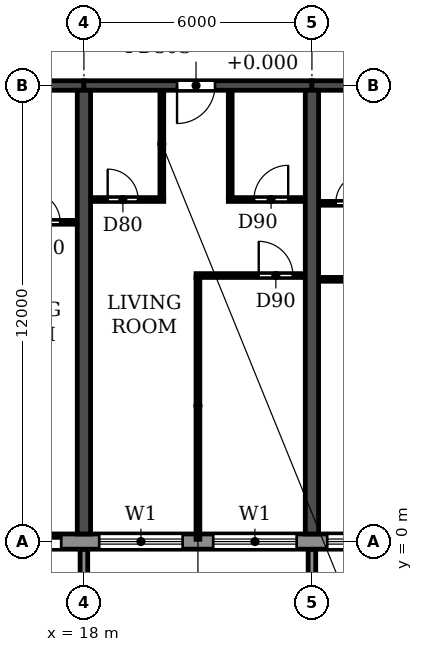
"""IFC4 building model, lengths in metres.
Left out: names, types, materials, properties, quantities, classifications, styles, units other than length and angle.
Written with IfcOpenShell. Run it as: python <this file> out.ifc"""

import sys

from ifc_helpers import new_model, si_unit, direction, frame, frame_2d, origin, place, context, subcontext, project, spatial, polyline, rectangle, outline, extrude, source, transform, mapped, element, fill, save


model = new_model("IFC4")
c1 = context("Model", 3, precision=1e-05, world=origin(), true_north=direction((0.0, 1.0)))
c2 = subcontext(c1, "Body", "Model", "MODEL_VIEW")
j1 = project(units=[si_unit("LENGTHUNIT", "METRE"), si_unit("PLANEANGLEUNIT", "RADIAN")], contexts=[c1])
p1 = place(None, origin())
s1 = spatial("IfcSite", under=j1, at=p1, CompositionType="ELEMENT")
p2 = place(p1, origin())
s2 = spatial("IfcBuilding", under=s1, at=p2, CompositionType="ELEMENT")
p3 = place(p2, frame((0.0, 0.0, 72.9)))
s3 = spatial("IfcBuildingStorey", under=s2, at=p3, CompositionType="ELEMENT", Elevation=72.9)
for number, where, z_axis, x_axis in (
    (1, (18.0, 0.2, 0.0), (0.0, 0.0, 1.0), (0.0, 1.0, 0.0)),
    (2, (24.0, 0.2, 0.0), (0.0, 0.0, 1.0), (0.0, 1.0, 0.0)),
):
    element("IfcWall", number, at=place(p3, frame(where, z_axis=z_axis, x_axis=x_axis)), inside=s3, PredefinedType="SHEAR", context=c2, shape_type="SweptSolid", body=[
        extrude(rectangle(XDim=11.675, YDim=0.35, at=frame_2d((5.837, 0.0))), origin(), (0.0, 0.0, 1.0), 3.06),
    ])
p4 = place(p3, frame((12.0, 12.0, 0.0), z_axis=(0.0, 0.0, 1.0), x_axis=(1.0, 0.0, 0.0)))
e3 = element("IfcWall", 3, at=p4, inside=s3, PredefinedType="SHEAR", context=c2, shape_type="SweptSolid", body=[
    extrude(rectangle(XDim=6.0, YDim=0.25, at=frame_2d((3.0, 0.0))), origin(), (0.0, 0.0, 1.0), 2.46),
])
p5 = place(p4, frame((2.55, 0.0, 0.0)))
e4 = element("IfcOpeningElement", 4, at=p5, cuts=e3, PredefinedType="OPENING", context=c2, shape_type="SweptSolid", body=[
    extrude(rectangle(XDim=1.0, YDim=2.1, at=frame_2d((0.5, 1.05))), frame((0.0, 0.135, 0.0), z_axis=(0.0, -1.0, 0.0), x_axis=(1.0, 0.0, 0.0)), (0.0, 0.0, 1.0), 0.27),
])
p6 = place(p3, frame((18.0, 12.0, 0.0), z_axis=(0.0, 0.0, 1.0), x_axis=(1.0, 0.0, 0.0)))
e5 = element("IfcWall", 5, at=p6, inside=s3, PredefinedType="SHEAR", context=c2, shape_type="SweptSolid", body=[
    extrude(rectangle(XDim=6.0, YDim=0.25, at=frame_2d((3.0, 0.0))), origin(), (0.0, 0.0, 1.0), 2.46),
])
p7 = place(p6, frame((2.45, 0.0, 0.0)))
e6 = element("IfcOpeningElement", 6, at=p7, cuts=e5, PredefinedType="OPENING", context=c2, shape_type="SweptSolid", body=[
    extrude(rectangle(XDim=1.0, YDim=2.1, at=frame_2d((0.5, 1.05))), frame((0.0, 0.135, 0.0), z_axis=(0.0, -1.0, 0.0), x_axis=(1.0, 0.0, 0.0)), (0.0, 0.0, 1.0), 0.27),
])
p8 = place(p3, frame((24.0, 12.0, 0.0), z_axis=(0.0, 0.0, 1.0), x_axis=(1.0, 0.0, 0.0)))
e7 = element("IfcWall", 7, at=p8, inside=s3, PredefinedType="SHEAR", context=c2, shape_type="SweptSolid", body=[
    extrude(rectangle(XDim=6.0, YDim=0.25, at=frame_2d((3.0, 0.0))), origin(), (0.0, 0.0, 1.0), 2.46),
])
p9 = place(p8, frame((2.45, 0.0, 0.0)))
e8 = element("IfcOpeningElement", 8, at=p9, cuts=e7, PredefinedType="OPENING", context=c2, shape_type="SweptSolid", body=[
    extrude(rectangle(XDim=1.0, YDim=2.1, at=frame_2d((0.5, 1.05))), frame((0.0, 0.135, 0.0), z_axis=(0.0, -1.0, 0.0), x_axis=(1.0, 0.0, 0.0)), (0.0, 0.0, 1.0), 0.27),
])
p10 = place(p3, frame((10.683, 0.0, 0.0), z_axis=(0.0, 0.0, 1.0), x_axis=(1.0, 0.0, 0.0)))
e9 = element("IfcWall", 9, at=p10, inside=s3, PredefinedType="STANDARD", context=c2, shape_type="SweptSolid", body=[
    extrude(rectangle(XDim=80.634, YDim=0.4, at=frame_2d((40.317, 0.0))), origin(), (0.0, 0.0, 1.0), 3.06),
])
p11 = place(p10, frame((1.717, 0.0, 0.9)))
e10 = element("IfcOpeningElement", 10, at=p11, cuts=e9, PredefinedType="OPENING", context=c2, shape_type="SweptSolid", body=[
    extrude(rectangle(XDim=2.2, YDim=1.5, at=frame_2d((1.1, 0.75))), frame((0.0, 0.21, 0.0), z_axis=(0.0, -1.0, 0.0), x_axis=(1.0, 0.0, 0.0)), (0.0, 0.0, 1.0), 0.42),
])
p12 = place(p10, frame((4.917, 0.0, 0.0)))
e11 = element("IfcOpeningElement", 11, at=p12, cuts=e9, PredefinedType="OPENING", context=c2, shape_type="SweptSolid", body=[
    extrude(rectangle(XDim=1.8, YDim=2.4, at=frame_2d((0.9, 1.2))), frame((0.0, 0.21, 0.0), z_axis=(0.0, -1.0, 0.0), x_axis=(1.0, 0.0, 0.0)), (0.0, 0.0, 1.0), 0.42),
])
p13 = place(p10, frame((7.717, 0.0, 0.9)))
e12 = element("IfcOpeningElement", 12, at=p13, cuts=e9, PredefinedType="OPENING", context=c2, shape_type="SweptSolid", body=[
    extrude(rectangle(XDim=2.2, YDim=1.5, at=frame_2d((1.1, 0.75))), frame((0.0, 0.21, 0.0), z_axis=(0.0, -1.0, 0.0), x_axis=(1.0, 0.0, 0.0)), (0.0, 0.0, 1.0), 0.42),
])
p14 = place(p10, frame((10.717, 0.0, 0.9)))
e13 = element("IfcOpeningElement", 13, at=p14, cuts=e9, PredefinedType="OPENING", context=c2, shape_type="SweptSolid", body=[
    extrude(rectangle(XDim=2.2, YDim=1.5, at=frame_2d((1.1, 0.75))), frame((0.0, 0.21, 0.0), z_axis=(0.0, -1.0, 0.0), x_axis=(1.0, 0.0, 0.0)), (0.0, 0.0, 1.0), 0.42),
])
p15 = place(p10, frame((13.717, 0.0, 0.9)))
e14 = element("IfcOpeningElement", 14, at=p15, cuts=e9, PredefinedType="OPENING", context=c2, shape_type="SweptSolid", body=[
    extrude(rectangle(XDim=2.2, YDim=1.5, at=frame_2d((1.1, 0.75))), frame((0.0, 0.21, 0.0), z_axis=(0.0, -1.0, 0.0), x_axis=(1.0, 0.0, 0.0)), (0.0, 0.0, 1.0), 0.42),
])
p16 = place(p10, frame((16.917, 0.0, 0.0)))
e15 = element("IfcOpeningElement", 15, at=p16, cuts=e9, PredefinedType="OPENING", context=c2, shape_type="SweptSolid", body=[
    extrude(rectangle(XDim=1.8, YDim=2.4, at=frame_2d((0.9, 1.2))), frame((0.0, 0.21, 0.0), z_axis=(0.0, -1.0, 0.0), x_axis=(1.0, 0.0, 0.0)), (0.0, 0.0, 1.0), 0.42),
])
p17 = place(p10, frame((19.717, 0.0, 0.9)))
e16 = element("IfcOpeningElement", 16, at=p17, cuts=e9, PredefinedType="OPENING", context=c2, shape_type="SweptSolid", body=[
    extrude(rectangle(XDim=2.2, YDim=1.5, at=frame_2d((1.1, 0.75))), frame((0.0, 0.21, 0.0), z_axis=(0.0, -1.0, 0.0), x_axis=(1.0, 0.0, 0.0)), (0.0, 0.0, 1.0), 0.42),
])
p18 = place(p10, frame((22.717, 0.0, 0.9)))
e17 = element("IfcOpeningElement", 17, at=p18, cuts=e9, PredefinedType="OPENING", context=c2, shape_type="SweptSolid", body=[
    extrude(rectangle(XDim=2.2, YDim=1.5, at=frame_2d((1.1, 0.75))), frame((0.0, 0.21, 0.0), z_axis=(0.0, -1.0, 0.0), x_axis=(1.0, 0.0, 0.0)), (0.0, 0.0, 1.0), 0.42),
])
p19 = place(p10, frame((25.917, 0.0, 0.0)))
e18 = element("IfcOpeningElement", 18, at=p19, cuts=e9, PredefinedType="OPENING", context=c2, shape_type="SweptSolid", body=[
    extrude(rectangle(XDim=1.8, YDim=2.4, at=frame_2d((0.9, 1.2))), frame((0.0, 0.21, 0.0), z_axis=(0.0, -1.0, 0.0), x_axis=(1.0, 0.0, 0.0)), (0.0, 0.0, 1.0), 0.42),
])
p20 = place(p10, frame((28.717, 0.0, 0.9)))
e19 = element("IfcOpeningElement", 19, at=p20, cuts=e9, PredefinedType="OPENING", context=c2, shape_type="SweptSolid", body=[
    extrude(rectangle(XDim=2.2, YDim=1.5, at=frame_2d((1.1, 0.75))), frame((0.0, 0.21, 0.0), z_axis=(0.0, -1.0, 0.0), x_axis=(1.0, 0.0, 0.0)), (0.0, 0.0, 1.0), 0.42),
])
p21 = place(p10, frame((31.717, 0.0, 0.9)))
e20 = element("IfcOpeningElement", 20, at=p21, cuts=e9, PredefinedType="OPENING", context=c2, shape_type="SweptSolid", body=[
    extrude(rectangle(XDim=2.2, YDim=1.5, at=frame_2d((1.1, 0.75))), frame((0.0, 0.21, 0.0), z_axis=(0.0, -1.0, 0.0), x_axis=(1.0, 0.0, 0.0)), (0.0, 0.0, 1.0), 0.42),
])
p22 = place(p10, frame((34.717, 0.0, 0.9)))
e21 = element("IfcOpeningElement", 21, at=p22, cuts=e9, PredefinedType="OPENING", context=c2, shape_type="SweptSolid", body=[
    extrude(rectangle(XDim=2.2, YDim=1.5, at=frame_2d((1.1, 0.75))), frame((0.0, 0.21, 0.0), z_axis=(0.0, -1.0, 0.0), x_axis=(1.0, 0.0, 0.0)), (0.0, 0.0, 1.0), 0.42),
])
p23 = place(p10, frame((37.917, 0.0, 0.0)))
e22 = element("IfcOpeningElement", 22, at=p23, cuts=e9, PredefinedType="OPENING", context=c2, shape_type="SweptSolid", body=[
    extrude(rectangle(XDim=1.8, YDim=2.4, at=frame_2d((0.9, 1.2))), frame((0.0, 0.21, 0.0), z_axis=(0.0, -1.0, 0.0), x_axis=(1.0, 0.0, 0.0)), (0.0, 0.0, 1.0), 0.42),
])
p24 = place(p10, frame((40.717, 0.0, 0.9)))
e23 = element("IfcOpeningElement", 23, at=p24, cuts=e9, PredefinedType="OPENING", context=c2, shape_type="SweptSolid", body=[
    extrude(rectangle(XDim=2.2, YDim=1.5, at=frame_2d((1.1, 0.75))), frame((0.0, 0.21, 0.0), z_axis=(0.0, -1.0, 0.0), x_axis=(1.0, 0.0, 0.0)), (0.0, 0.0, 1.0), 0.42),
])
p25 = place(p10, frame((43.717, 0.0, 0.9)))
e24 = element("IfcOpeningElement", 24, at=p25, cuts=e9, PredefinedType="OPENING", context=c2, shape_type="SweptSolid", body=[
    extrude(rectangle(XDim=2.2, YDim=1.5, at=frame_2d((1.1, 0.75))), frame((0.0, 0.21, 0.0), z_axis=(0.0, -1.0, 0.0), x_axis=(1.0, 0.0, 0.0)), (0.0, 0.0, 1.0), 0.42),
])
p26 = place(p10, frame((46.717, 0.0, 0.9)))
e25 = element("IfcOpeningElement", 25, at=p26, cuts=e9, PredefinedType="OPENING", context=c2, shape_type="SweptSolid", body=[
    extrude(rectangle(XDim=2.2, YDim=1.5, at=frame_2d((1.1, 0.75))), frame((0.0, 0.21, 0.0), z_axis=(0.0, -1.0, 0.0), x_axis=(1.0, 0.0, 0.0)), (0.0, 0.0, 1.0), 0.42),
])
p27 = place(p10, frame((49.917, 0.0, 0.0)))
e26 = element("IfcOpeningElement", 26, at=p27, cuts=e9, PredefinedType="OPENING", context=c2, shape_type="SweptSolid", body=[
    extrude(rectangle(XDim=1.8, YDim=2.4, at=frame_2d((0.9, 1.2))), frame((0.0, 0.21, 0.0), z_axis=(0.0, -1.0, 0.0), x_axis=(1.0, 0.0, 0.0)), (0.0, 0.0, 1.0), 0.42),
])
p28 = place(p10, frame((52.717, 0.0, 0.9)))
e27 = element("IfcOpeningElement", 27, at=p28, cuts=e9, PredefinedType="OPENING", context=c2, shape_type="SweptSolid", body=[
    extrude(rectangle(XDim=2.2, YDim=1.5, at=frame_2d((1.1, 0.75))), frame((0.0, 0.21, 0.0), z_axis=(0.0, -1.0, 0.0), x_axis=(1.0, 0.0, 0.0)), (0.0, 0.0, 1.0), 0.42),
])
p29 = place(p10, frame((55.717, 0.0, 0.9)))
e28 = element("IfcOpeningElement", 28, at=p29, cuts=e9, PredefinedType="OPENING", context=c2, shape_type="SweptSolid", body=[
    extrude(rectangle(XDim=2.2, YDim=1.5, at=frame_2d((1.1, 0.75))), frame((0.0, 0.21, 0.0), z_axis=(0.0, -1.0, 0.0), x_axis=(1.0, 0.0, 0.0)), (0.0, 0.0, 1.0), 0.42),
])
p30 = place(p10, frame((58.717, 0.0, 0.9)))
e29 = element("IfcOpeningElement", 29, at=p30, cuts=e9, PredefinedType="OPENING", context=c2, shape_type="SweptSolid", body=[
    extrude(rectangle(XDim=2.2, YDim=1.5, at=frame_2d((1.1, 0.75))), frame((0.0, 0.21, 0.0), z_axis=(0.0, -1.0, 0.0), x_axis=(1.0, 0.0, 0.0)), (0.0, 0.0, 1.0), 0.42),
])
p31 = place(p10, frame((61.717, 0.0, 0.9)))
e30 = element("IfcOpeningElement", 30, at=p31, cuts=e9, PredefinedType="OPENING", context=c2, shape_type="SweptSolid", body=[
    extrude(rectangle(XDim=2.2, YDim=1.5, at=frame_2d((1.1, 0.75))), frame((0.0, 0.21, 0.0), z_axis=(0.0, -1.0, 0.0), x_axis=(1.0, 0.0, 0.0)), (0.0, 0.0, 1.0), 0.42),
])
p32 = place(p10, frame((64.917, 0.0, 0.0)))
e31 = element("IfcOpeningElement", 31, at=p32, cuts=e9, PredefinedType="OPENING", context=c2, shape_type="SweptSolid", body=[
    extrude(rectangle(XDim=1.8, YDim=2.4, at=frame_2d((0.9, 1.2))), frame((0.0, 0.21, 0.0), z_axis=(0.0, -1.0, 0.0), x_axis=(1.0, 0.0, 0.0)), (0.0, 0.0, 1.0), 0.42),
])
p33 = place(p10, frame((67.717, 0.0, 0.9)))
e32 = element("IfcOpeningElement", 32, at=p33, cuts=e9, PredefinedType="OPENING", context=c2, shape_type="SweptSolid", body=[
    extrude(rectangle(XDim=2.2, YDim=1.5, at=frame_2d((1.1, 0.75))), frame((0.0, 0.21, 0.0), z_axis=(0.0, -1.0, 0.0), x_axis=(1.0, 0.0, 0.0)), (0.0, 0.0, 1.0), 0.42),
])
p34 = place(p10, frame((70.717, 0.0, 0.9)))
e33 = element("IfcOpeningElement", 33, at=p34, cuts=e9, PredefinedType="OPENING", context=c2, shape_type="SweptSolid", body=[
    extrude(rectangle(XDim=2.2, YDim=1.5, at=frame_2d((1.1, 0.75))), frame((0.0, 0.21, 0.0), z_axis=(0.0, -1.0, 0.0), x_axis=(1.0, 0.0, 0.0)), (0.0, 0.0, 1.0), 0.42),
])
p35 = place(p10, frame((73.917, 0.0, 0.0)))
e34 = element("IfcOpeningElement", 34, at=p35, cuts=e9, PredefinedType="OPENING", context=c2, shape_type="SweptSolid", body=[
    extrude(rectangle(XDim=1.8, YDim=2.4, at=frame_2d((0.9, 1.2))), frame((0.0, 0.21, 0.0), z_axis=(0.0, -1.0, 0.0), x_axis=(1.0, 0.0, 0.0)), (0.0, 0.0, 1.0), 0.42),
])
p36 = place(p10, frame((76.717, 0.0, 0.9)))
e35 = element("IfcOpeningElement", 35, at=p36, cuts=e9, PredefinedType="OPENING", context=c2, shape_type="SweptSolid", body=[
    extrude(rectangle(XDim=2.2, YDim=1.5, at=frame_2d((1.1, 0.75))), frame((0.0, 0.21, 0.0), z_axis=(0.0, -1.0, 0.0), x_axis=(1.0, 0.0, 0.0)), (0.0, 0.0, 1.0), 0.42),
])
m1 = source(origin(), c2, "Body", "SweptSolid", [
    extrude(outline(polyline([(0.0, 0.0), (0.2, 0.0), (0.2, 1.65), (0.0, 1.65), (0.0, 0.0)])), origin(), (0.0, 0.0, 1.0), 3.1),
])
for number, where in (
    (36, (17.9, -1.85, 0.0)),
    (37, (23.9, -1.85, 0.0)),
):
    element("IfcWall", number, at=place(p3, frame(where)), inside=s3, PredefinedType="STANDARD", context=c2, shape_type="MappedRepresentation", body=[
        mapped(m1, transform((0.0, 0.0, 0.0))),
    ])
p37 = place(p3, frame((24.185, 6.9, 0.0), z_axis=(0.0, 0.0, 1.0), x_axis=(1.0, 0.0, 0.0)))
e38 = element("IfcWall", 38, at=p37, inside=s3, PredefinedType="PARTITIONING", context=c2, shape_type="SweptSolid", body=[
    extrude(rectangle(XDim=2.865, YDim=0.1, at=frame_2d((1.433, 0.0))), origin(), (0.0, 0.0, 1.0), 3.06),
])
p38 = place(p37, frame((1.415, 0.0, 0.0)))
e39 = element("IfcOpeningElement", 39, at=p38, cuts=e38, PredefinedType="OPENING", context=c2, shape_type="SweptSolid", body=[
    extrude(rectangle(XDim=0.9, YDim=2.1, at=frame_2d((0.45, 1.05))), frame((0.0, 0.06, 0.0), z_axis=(0.0, -1.0, 0.0), x_axis=(1.0, 0.0, 0.0)), (0.0, 0.0, 1.0), 0.12),
])
p39 = place(p3, frame((20.95, 7.0, 0.0), z_axis=(0.0, 0.0, 1.0), x_axis=(1.0, 0.0, 0.0)))
e40 = element("IfcWall", 40, at=p39, inside=s3, PredefinedType="PARTITIONING", context=c2, shape_type="SweptSolid", body=[
    extrude(rectangle(XDim=2.865, YDim=0.1, at=frame_2d((1.433, 0.0))), origin(), (0.0, 0.0, 1.0), 3.06),
])
p40 = place(p39, frame((1.65, 0.0, 0.0)))
e41 = element("IfcOpeningElement", 41, at=p40, cuts=e40, PredefinedType="OPENING", context=c2, shape_type="SweptSolid", body=[
    extrude(rectangle(XDim=0.9, YDim=2.1, at=frame_2d((0.45, 1.05))), frame((0.0, 0.06, 0.0), z_axis=(0.0, -1.0, 0.0), x_axis=(1.0, 0.0, 0.0)), (0.0, 0.0, 1.0), 0.12),
])
p41 = place(p3, frame((15.9, 8.4, 0.0), z_axis=(0.0, 0.0, 1.0), x_axis=(1.0, 0.0, 0.0)))
e42 = element("IfcWall", 42, at=p41, inside=s3, PredefinedType="PARTITIONING", context=c2, shape_type="SweptSolid", body=[
    extrude(rectangle(XDim=1.915, YDim=0.1, at=frame_2d((0.958, 0.0))), origin(), (0.0, 0.0, 1.0), 3.06),
])
p42 = place(p41, frame((0.675, 0.0, 0.0)))
e43 = element("IfcOpeningElement", 43, at=p42, cuts=e42, PredefinedType="OPENING", context=c2, shape_type="SweptSolid", body=[
    extrude(rectangle(XDim=0.8, YDim=2.1, at=frame_2d((0.4, 1.05))), frame((0.0, 0.06, 0.0), z_axis=(0.0, -1.0, 0.0), x_axis=(1.0, 0.0, 0.0)), (0.0, 0.0, 1.0), 0.12),
])
p43 = place(p3, frame((24.185, 8.9, 0.0), z_axis=(0.0, 0.0, 1.0), x_axis=(1.0, 0.0, 0.0)))
e44 = element("IfcWall", 44, at=p43, inside=s3, PredefinedType="PARTITIONING", context=c2, shape_type="SweptSolid", body=[
    extrude(rectangle(XDim=1.915, YDim=0.1, at=frame_2d((0.958, 0.0))), origin(), (0.0, 0.0, 1.0), 3.06),
])
p44 = place(p43, frame((0.44, 0.0, 0.0)))
e45 = element("IfcOpeningElement", 45, at=p44, cuts=e44, PredefinedType="OPENING", context=c2, shape_type="SweptSolid", body=[
    extrude(rectangle(XDim=0.8, YDim=2.1, at=frame_2d((0.4, 1.05))), frame((0.0, 0.06, 0.0), z_axis=(0.0, -1.0, 0.0), x_axis=(1.0, 0.0, 0.0)), (0.0, 0.0, 1.0), 0.12),
])
p45 = place(p3, frame((18.185, 9.0, 0.0), z_axis=(0.0, 0.0, 1.0), x_axis=(1.0, 0.0, 0.0)))
e46 = element("IfcWall", 46, at=p45, inside=s3, PredefinedType="PARTITIONING", context=c2, shape_type="SweptSolid", body=[
    extrude(rectangle(XDim=1.915, YDim=0.1, at=frame_2d((0.958, 0.0))), origin(), (0.0, 0.0, 1.0), 3.06),
])
p46 = place(p45, frame((0.44, 0.0, 0.0)))
e47 = element("IfcOpeningElement", 47, at=p46, cuts=e46, PredefinedType="OPENING", context=c2, shape_type="SweptSolid", body=[
    extrude(rectangle(XDim=0.8, YDim=2.1, at=frame_2d((0.4, 1.05))), frame((0.0, 0.06, 0.0), z_axis=(0.0, -1.0, 0.0), x_axis=(1.0, 0.0, 0.0)), (0.0, 0.0, 1.0), 0.12),
])
p47 = place(p3, frame((21.8, 9.0, 0.0), z_axis=(0.0, 0.0, 1.0), x_axis=(1.0, 0.0, 0.0)))
e48 = element("IfcWall", 48, at=p47, inside=s3, PredefinedType="PARTITIONING", context=c2, shape_type="SweptSolid", body=[
    extrude(rectangle(XDim=2.015, YDim=0.1, at=frame_2d((1.007, 0.0))), origin(), (0.0, 0.0, 1.0), 3.06),
])
p48 = place(p47, frame((0.675, 0.0, 0.0)))
e49 = element("IfcOpeningElement", 49, at=p48, cuts=e48, PredefinedType="OPENING", context=c2, shape_type="SweptSolid", body=[
    extrude(rectangle(XDim=0.9, YDim=2.1, at=frame_2d((0.45, 1.05))), frame((0.0, 0.06, 0.0), z_axis=(0.0, -1.0, 0.0), x_axis=(1.0, 0.0, 0.0)), (0.0, 0.0, 1.0), 0.12),
])
p49 = place(p3, frame((20.05, 9.05, 0.0), z_axis=(0.0, 0.0, 1.0), x_axis=(0.0, 1.0, 0.0)))
e50 = element("IfcWall", 50, at=p49, inside=s3, PredefinedType="PARTITIONING", context=c2, shape_type="SweptSolid", body=[
    extrude(rectangle(XDim=2.815, YDim=0.1, at=frame_2d((1.407, 0.0))), origin(), (0.0, 0.0, 1.0), 3.06),
])
p50 = place(p3, frame((21.0, 0.06, 0.0), z_axis=(0.0, 0.0, 1.0), x_axis=(0.0, 1.0, 0.0)))
e51 = element("IfcWall", 51, at=p50, inside=s3, PredefinedType="PARTITIONING", context=c2, shape_type="SweptSolid", body=[
    extrude(rectangle(XDim=6.89, YDim=0.1, at=frame_2d((3.445, 0.0))), origin(), (0.0, 0.0, 1.0), 3.06),
])
p51 = place(p3, frame((21.85, 9.05, 0.0), z_axis=(0.0, 0.0, 1.0), x_axis=(0.0, 1.0, 0.0)))
e52 = element("IfcWall", 52, at=p51, inside=s3, PredefinedType="PARTITIONING", context=c2, shape_type="SweptSolid", body=[
    extrude(rectangle(XDim=2.815, YDim=0.1, at=frame_2d((1.407, 0.0))), origin(), (0.0, 0.0, 1.0), 3.06),
])
p52 = place(p12, origin())
e53 = element("IfcDoor", 53, at=p52, inside=s3, OperationType="DOUBLE_DOOR_SLIDING", PredefinedType="DOOR", context=c2, shape_type="SweptSolid", body=[
    extrude(rectangle(XDim=1.8, YDim=2.4, at=frame_2d((0.9, 1.2))), frame((0.0, 0.025, 0.0), z_axis=(0.0, -1.0, 0.0), x_axis=(1.0, 0.0, 0.0)), (0.0, 0.0, 1.0), 0.05),
])
fill(e11, e53)
p53 = place(p13, origin())
e54 = element("IfcWindow", 54, at=p53, inside=s3, PartitioningType="DOUBLE_PANEL_HORIZONTAL", PredefinedType="WINDOW", context=c2, shape_type="SweptSolid", body=[
    extrude(rectangle(XDim=2.2, YDim=1.5, at=frame_2d((1.1, 0.75))), frame((0.0, 0.03, 0.0), z_axis=(0.0, -1.0, 0.0), x_axis=(1.0, 0.0, 0.0)), (0.0, 0.0, 1.0), 0.06),
])
fill(e12, e54)
p54 = place(p14, origin())
e55 = element("IfcWindow", 55, at=p54, inside=s3, PartitioningType="DOUBLE_PANEL_HORIZONTAL", PredefinedType="WINDOW", context=c2, shape_type="SweptSolid", body=[
    extrude(rectangle(XDim=2.2, YDim=1.5, at=frame_2d((1.1, 0.75))), frame((0.0, 0.03, 0.0), z_axis=(0.0, -1.0, 0.0), x_axis=(1.0, 0.0, 0.0)), (0.0, 0.0, 1.0), 0.06),
])
fill(e13, e55)
p55 = place(p15, origin())
e56 = element("IfcWindow", 56, at=p55, inside=s3, PartitioningType="DOUBLE_PANEL_HORIZONTAL", PredefinedType="WINDOW", context=c2, shape_type="SweptSolid", body=[
    extrude(rectangle(XDim=2.2, YDim=1.5, at=frame_2d((1.1, 0.75))), frame((0.0, 0.03, 0.0), z_axis=(0.0, -1.0, 0.0), x_axis=(1.0, 0.0, 0.0)), (0.0, 0.0, 1.0), 0.06),
])
fill(e14, e56)
p56 = place(p42, origin())
e57 = element("IfcDoor", 57, at=p56, inside=s3, OperationType="SINGLE_SWING_LEFT", PredefinedType="DOOR", context=c2, shape_type="SweptSolid", body=[
    extrude(rectangle(XDim=0.8, YDim=2.1, at=frame_2d((0.4, 1.05))), frame((0.0, 0.025, 0.0), z_axis=(0.0, -1.0, 0.0), x_axis=(1.0, 0.0, 0.0)), (0.0, 0.0, 1.0), 0.05),
])
fill(e43, e57)
p57 = place(p46, origin())
e58 = element("IfcDoor", 58, at=p57, inside=s3, OperationType="SINGLE_SWING_LEFT", PredefinedType="DOOR", context=c2, shape_type="SweptSolid", body=[
    extrude(rectangle(XDim=0.8, YDim=2.1, at=frame_2d((0.4, 1.05))), frame((0.0, 0.025, 0.0), z_axis=(0.0, -1.0, 0.0), x_axis=(1.0, 0.0, 0.0)), (0.0, 0.0, 1.0), 0.05),
])
fill(e47, e58)
p58 = place(p7, frame((1.0, 0.0, 0.0), z_axis=(0.0, 0.0, 1.0), x_axis=(-1.0, 0.0, 0.0)))
e59 = element("IfcDoor", 59, at=p58, inside=s3, OperationType="SINGLE_SWING_RIGHT", PredefinedType="DOOR", context=c2, shape_type="SweptSolid", body=[
    extrude(rectangle(XDim=1.0, YDim=2.1, at=frame_2d((0.5, 1.05))), frame((0.0, 0.025, 0.0), z_axis=(0.0, -1.0, 0.0), x_axis=(1.0, 0.0, 0.0)), (0.0, 0.0, 1.0), 0.05),
])
fill(e6, e59)
p59 = place(p48, origin())
e60 = element("IfcDoor", 60, at=p59, inside=s3, OperationType="SINGLE_SWING_RIGHT", PredefinedType="DOOR", context=c2, shape_type="SweptSolid", body=[
    extrude(rectangle(XDim=0.9, YDim=2.1, at=frame_2d((0.45, 1.05))), frame((0.0, 0.025, 0.0), z_axis=(0.0, -1.0, 0.0), x_axis=(1.0, 0.0, 0.0)), (0.0, 0.0, 1.0), 0.05),
])
fill(e49, e60)
p60 = place(p40, origin())
e61 = element("IfcDoor", 61, at=p60, inside=s3, OperationType="SINGLE_SWING_LEFT", PredefinedType="DOOR", context=c2, shape_type="SweptSolid", body=[
    extrude(rectangle(XDim=0.9, YDim=2.1, at=frame_2d((0.45, 1.05))), frame((0.0, 0.025, 0.0), z_axis=(0.0, -1.0, 0.0), x_axis=(1.0, 0.0, 0.0)), (0.0, 0.0, 1.0), 0.05),
])
fill(e41, e61)
p61 = place(p44, origin())
e62 = element("IfcDoor", 62, at=p61, inside=s3, OperationType="SINGLE_SWING_RIGHT", PredefinedType="DOOR", context=c2, shape_type="SweptSolid", body=[
    extrude(rectangle(XDim=0.8, YDim=2.1, at=frame_2d((0.4, 1.05))), frame((0.0, 0.025, 0.0), z_axis=(0.0, -1.0, 0.0), x_axis=(1.0, 0.0, 0.0)), (0.0, 0.0, 1.0), 0.05),
])
fill(e45, e62)
save(model, sys.argv[1])
